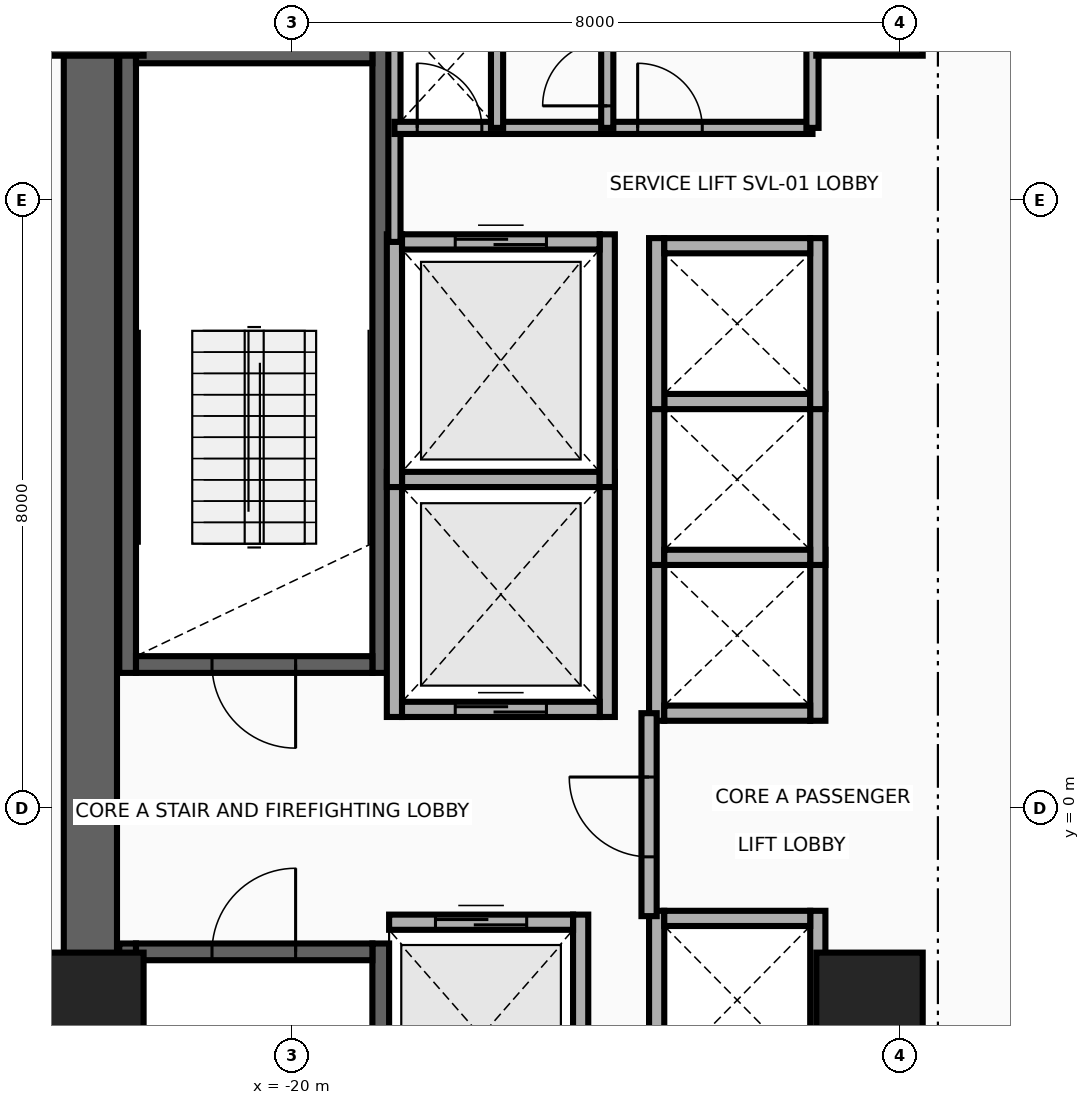
"""IFC4 building model, lengths in metres.
Left out: names, types, materials, properties, quantities, classifications, styles, units other than length and angle.
Written with IfcOpenShell. Run it as: python <this file> out.ifc"""

import sys

from ifc_helpers import new_model, si_unit, direction, frame, frame_2d, origin, origin_2d, place, context, subcontext, project, spatial, rectangle, extrude, source, transform, mapped, element, fill, save


model = new_model("IFC4")
c1 = context("Model", 3, precision=1e-05, world=origin(), true_north=direction((0.0, 1.0)))
c2 = subcontext(c1, "Body", "Model", "MODEL_VIEW")
j1 = project(units=[si_unit("LENGTHUNIT", "METRE"), si_unit("PLANEANGLEUNIT", "RADIAN")], contexts=[c1])
p1 = place(None, origin())
s1 = spatial("IfcSite", under=j1, at=p1, CompositionType="ELEMENT")
p2 = place(p1, origin())
s2 = spatial("IfcBuilding", under=s1, at=p2, CompositionType="ELEMENT")
p3 = place(p2, frame((0.0, 0.0, 44.5)))
s3 = spatial("IfcBuildingStorey", under=s2, at=p3, CompositionType="ELEMENT", Elevation=44.5)
for number, where, z_axis, x_axis in (
    (1, (-22.16, 1.78, 0.0), (0.0, 0.0, 1.0), (0.0, 1.0, 0.0)),
    (2, (-18.83, 1.78, 0.0), (0.0, 0.0, 1.0), (0.0, 1.0, 0.0)),
):
    element("IfcWall", number, at=place(p3, frame(where, z_axis=z_axis, x_axis=x_axis)), inside=s3, PredefinedType="SHEAR", context=c2, shape_type="SweptSolid", body=[
        extrude(rectangle(XDim=8.67, YDim=0.22, at=frame_2d((4.335, 0.0))), origin(), (0.0, 0.0, 1.0), 3.46),
    ])
p4 = place(p3, frame((-22.05, 1.89, 0.0), z_axis=(0.0, 0.0, 1.0), x_axis=(1.0, 0.0, 0.0)))
e3 = element("IfcWall", 3, at=p4, inside=s3, PredefinedType="SHEAR", context=c2, shape_type="SweptSolid", body=[
    extrude(rectangle(XDim=3.11, YDim=0.22, at=frame_2d((1.555, 0.0))), origin(), (0.0, 0.0, 1.0), 3.46),
])
p5 = place(p4, frame((1.0, 0.0, 0.0)))
e4 = element("IfcOpeningElement", 4, at=p5, cuts=e3, PredefinedType="OPENING", context=c2, shape_type="SweptSolid", body=[
    extrude(rectangle(XDim=1.1, YDim=2.15, at=frame_2d((0.55, 1.075))), frame((0.0, 0.125, 0.0), z_axis=(0.0, -1.0, 0.0), x_axis=(1.0, 0.0, 0.0)), (0.0, 0.0, 1.0), 0.25),
])
p6 = place(p3, frame((-22.05, 9.91, 0.0), z_axis=(0.0, 0.0, 1.0), x_axis=(1.0, 0.0, 0.0)))
e5 = element("IfcWall", 5, at=p6, inside=s3, PredefinedType="SHEAR", context=c2, shape_type="SweptSolid", body=[
    extrude(rectangle(XDim=3.11, YDim=0.22, at=frame_2d((1.555, 0.0))), origin(), (0.0, 0.0, 1.0), 3.46),
])
for number, where, z_axis, x_axis in (
    (6, (-22.16, -10.45, 0.0), (0.0, 0.0, 1.0), (0.0, 1.0, 0.0)),
    (7, (-18.83, -10.45, 0.0), (0.0, 0.0, 1.0), (0.0, 1.0, 0.0)),
):
    element("IfcWall", number, at=place(p3, frame(where, z_axis=z_axis, x_axis=x_axis)), inside=s3, PredefinedType="SHEAR", context=c2, shape_type="SweptSolid", body=[
        extrude(rectangle(XDim=8.67, YDim=0.22, at=frame_2d((4.335, 0.0))), origin(), (0.0, 0.0, 1.0), 3.46),
    ])
p7 = place(p3, frame((-22.05, -1.89, 0.0), z_axis=(0.0, 0.0, 1.0), x_axis=(1.0, 0.0, 0.0)))
e8 = element("IfcWall", 8, at=p7, inside=s3, PredefinedType="SHEAR", context=c2, shape_type="SweptSolid", body=[
    extrude(rectangle(XDim=3.11, YDim=0.22, at=frame_2d((1.555, 0.0))), origin(), (0.0, 0.0, 1.0), 3.46),
])
p8 = place(p7, frame((1.0, 0.0, 0.0)))
e9 = element("IfcOpeningElement", 9, at=p8, cuts=e8, PredefinedType="OPENING", context=c2, shape_type="SweptSolid", body=[
    extrude(rectangle(XDim=1.1, YDim=2.15, at=frame_2d((0.55, 1.075))), frame((0.0, 0.125, 0.0), z_axis=(0.0, -1.0, 0.0), x_axis=(1.0, 0.0, 0.0)), (0.0, 0.0, 1.0), 0.25),
])
p9 = place(p3, frame((-22.65, -11.15, 0.0), z_axis=(0.0, 0.0, 1.0), x_axis=(0.0, 1.0, 0.0)))
e10 = element("IfcWall", 10, at=p9, inside=s3, PredefinedType="SHEAR", context=c2, shape_type="SweptSolid", body=[
    extrude(rectangle(XDim=22.3, YDim=0.7, at=frame_2d((11.15, 0.0))), origin(), (0.0, 0.0, 1.0), 3.46),
])
m1 = source(origin(), c2, "Body", "SweptSolid", [
    extrude(rectangle(XDim=1.4, YDim=1.4, at=origin_2d()), origin(), (0.0, 0.0, 1.0), 3.7),
])
for number, where, z_axis, x_axis in (
    (11, (-22.65, -2.6, 0.0), (0.0, 0.0, 1.0), (1.0, 0.0, 0.0)),
    (12, (-12.4, -2.6, 0.0), (0.0, 0.0, 1.0), (1.0, 0.0, 0.0)),
    (13, (-22.65, 10.6, 0.0), (0.0, 0.0, 1.0), (1.0, 0.0, 0.0)),
    (14, (-12.4, 10.6, 0.0), (0.0, 0.0, 1.0), (1.0, 0.0, 0.0)),
):
    element("IfcColumn", number, at=place(p3, frame(where, z_axis=z_axis, x_axis=x_axis)), inside=s3, PredefinedType="COLUMN", context=c2, shape_type="MappedRepresentation", body=[
        mapped(m1, transform((0.0, 0.0, 0.0), x_axis=(1.0, 0.0, 0.0), y_axis=(0.0, 1.0, 0.0), z_axis=(0.0, 0.0, 1.0), scale=1.0)),
    ])
for number, where, z_axis, x_axis in (
    (15, (-18.65, 1.2, 0.0), (0.0, 0.0, 1.0), (0.0, 1.0, 0.0)),
    (16, (-15.85, 1.2, 0.0), (0.0, 0.0, 1.0), (0.0, 1.0, 0.0)),
):
    element("IfcWall", number, at=place(p3, frame(where, z_axis=z_axis, x_axis=x_axis)), inside=s3, PredefinedType="MOVABLE", context=c2, shape_type="SweptSolid", body=[
        extrude(rectangle(XDim=3.225, YDim=0.2, at=frame_2d((1.613, 0.0))), origin(), (0.0, 0.0, 1.0), 3.46),
    ])
p10 = place(p3, frame((-18.55, 1.3, 0.0), z_axis=(0.0, 0.0, 1.0), x_axis=(1.0, 0.0, 0.0)))
e17 = element("IfcWall", 17, at=p10, inside=s3, PredefinedType="MOVABLE", context=c2, shape_type="SweptSolid", body=[
    extrude(rectangle(XDim=2.6, YDim=0.2, at=frame_2d((1.3, 0.0))), origin(), (0.0, 0.0, 1.0), 3.46),
])
p11 = place(p10, frame((0.7, 0.0, 0.0)))
e18 = element("IfcOpeningElement", 18, at=p11, cuts=e17, PredefinedType="OPENING", context=c2, shape_type="SweptSolid", body=[
    extrude(rectangle(XDim=1.2, YDim=2.1, at=frame_2d((0.6, 1.05))), frame((0.0, 0.115, 0.0), z_axis=(0.0, -1.0, 0.0), x_axis=(1.0, 0.0, 0.0)), (0.0, 0.0, 1.0), 0.23),
])
p12 = place(p3, frame((-18.55, 4.325, 0.0), z_axis=(0.0, 0.0, 1.0), x_axis=(1.0, 0.0, 0.0)))
e19 = element("IfcWall", 19, at=p12, inside=s3, PredefinedType="MOVABLE", context=c2, shape_type="SweptSolid", body=[
    extrude(rectangle(XDim=2.6, YDim=0.2, at=frame_2d((1.3, 0.0))), origin(), (0.0, 0.0, 1.0), 3.46),
])
p13 = place(p3, frame((-16.2, -4.6, 0.0), z_axis=(0.0, 0.0, 1.0), x_axis=(0.0, 1.0, 0.0)))
e20 = element("IfcWall", 20, at=p13, inside=s3, PredefinedType="MOVABLE", context=c2, shape_type="SweptSolid", body=[
    extrude(rectangle(XDim=3.2, YDim=0.2, at=frame_2d((1.6, 0.0))), origin(), (0.0, 0.0, 1.0), 3.46),
])
p14 = place(p3, frame((-18.72, -1.5, 0.0), z_axis=(0.0, 0.0, 1.0), x_axis=(1.0, 0.0, 0.0)))
e21 = element("IfcWall", 21, at=p14, inside=s3, PredefinedType="MOVABLE", context=c2, shape_type="SweptSolid", body=[
    extrude(rectangle(XDim=2.42, YDim=0.2, at=frame_2d((1.21, 0.0))), origin(), (0.0, 0.0, 1.0), 3.46),
])
p15 = place(p14, frame((0.61, 0.0, 0.0)))
e22 = element("IfcOpeningElement", 22, at=p15, cuts=e21, PredefinedType="OPENING", context=c2, shape_type="SweptSolid", body=[
    extrude(rectangle(XDim=1.2, YDim=2.1, at=frame_2d((0.6, 1.05))), frame((0.0, 0.115, 0.0), z_axis=(0.0, -1.0, 0.0), x_axis=(1.0, 0.0, 0.0)), (0.0, 0.0, 1.0), 0.23),
])
for number, where, z_axis, x_axis in (
    (23, (-18.65, 4.225, 0.0), (0.0, 0.0, 1.0), (0.0, 1.0, 0.0)),
    (24, (-15.85, 4.225, 0.0), (0.0, 0.0, 1.0), (0.0, 1.0, 0.0)),
):
    element("IfcWall", number, at=place(p3, frame(where, z_axis=z_axis, x_axis=x_axis)), inside=s3, PredefinedType="MOVABLE", context=c2, shape_type="SweptSolid", body=[
        extrude(rectangle(XDim=3.325, YDim=0.2, at=frame_2d((1.663, 0.0))), origin(), (0.0, 0.0, 1.0), 3.46),
    ])
p16 = place(p3, frame((-18.55, 7.45, 0.0), z_axis=(0.0, 0.0, 1.0), x_axis=(1.0, 0.0, 0.0)))
e25 = element("IfcWall", 25, at=p16, inside=s3, PredefinedType="MOVABLE", context=c2, shape_type="SweptSolid", body=[
    extrude(rectangle(XDim=2.6, YDim=0.2, at=frame_2d((1.3, 0.0))), origin(), (0.0, 0.0, 1.0), 3.46),
])
p17 = place(p16, frame((0.7, 0.0, 0.0)))
e26 = element("IfcOpeningElement", 26, at=p17, cuts=e25, PredefinedType="OPENING", context=c2, shape_type="SweptSolid", body=[
    extrude(rectangle(XDim=1.2, YDim=2.1, at=frame_2d((0.6, 1.05))), frame((0.0, 0.115, 0.0), z_axis=(0.0, -1.0, 0.0), x_axis=(1.0, 0.0, 0.0)), (0.0, 0.0, 1.0), 0.23),
])
for number, where, z_axis, x_axis in (
    (27, (-15.2, 1.15, 0.0), (0.0, 0.0, 1.0), (0.0, 1.0, 0.0)),
    (28, (-13.08, 1.15, 0.0), (0.0, 0.0, 1.0), (0.0, 1.0, 0.0)),
):
    element("IfcWall", number, at=place(p3, frame(where, z_axis=z_axis, x_axis=x_axis)), inside=s3, PredefinedType="MOVABLE", context=c2, shape_type="SweptSolid", body=[
        extrude(rectangle(XDim=2.25, YDim=0.2, at=frame_2d((1.125, 0.0))), origin(), (0.0, 0.0, 1.0), 3.46),
    ])
p18 = place(p3, frame((-15.1, 1.25, 0.0), z_axis=(0.0, 0.0, 1.0), x_axis=(1.0, 0.0, 0.0)))
e29 = element("IfcWall", 29, at=p18, inside=s3, PredefinedType="MOVABLE", context=c2, shape_type="SweptSolid", body=[
    extrude(rectangle(XDim=1.92, YDim=0.2, at=frame_2d((0.96, 0.0))), origin(), (0.0, 0.0, 1.0), 3.46),
])
for number, where, z_axis, x_axis in (
    (30, (-15.2, 3.2, 0.0), (0.0, 0.0, 1.0), (0.0, 1.0, 0.0)),
    (31, (-13.08, 3.2, 0.0), (0.0, 0.0, 1.0), (0.0, 1.0, 0.0)),
):
    element("IfcWall", number, at=place(p3, frame(where, z_axis=z_axis, x_axis=x_axis)), inside=s3, PredefinedType="MOVABLE", context=c2, shape_type="SweptSolid", body=[
        extrude(rectangle(XDim=2.25, YDim=0.2, at=frame_2d((1.125, 0.0))), origin(), (0.0, 0.0, 1.0), 3.46),
    ])
for number, where, z_axis, x_axis in (
    (32, (-15.1, 3.3, 0.0), (0.0, 0.0, 1.0), (1.0, 0.0, 0.0)),
    (33, (-15.1, 5.35, 0.0), (0.0, 0.0, 1.0), (1.0, 0.0, 0.0)),
):
    element("IfcWall", number, at=place(p3, frame(where, z_axis=z_axis, x_axis=x_axis)), inside=s3, PredefinedType="MOVABLE", context=c2, shape_type="SweptSolid", body=[
        extrude(rectangle(XDim=1.92, YDim=0.2, at=frame_2d((0.96, 0.0))), origin(), (0.0, 0.0, 1.0), 3.46),
    ])
for number, where, z_axis, x_axis in (
    (34, (-15.2, 5.25, 0.0), (0.0, 0.0, 1.0), (0.0, 1.0, 0.0)),
    (35, (-13.08, 5.25, 0.0), (0.0, 0.0, 1.0), (0.0, 1.0, 0.0)),
):
    element("IfcWall", number, at=place(p3, frame(where, z_axis=z_axis, x_axis=x_axis)), inside=s3, PredefinedType="MOVABLE", context=c2, shape_type="SweptSolid", body=[
        extrude(rectangle(XDim=2.25, YDim=0.2, at=frame_2d((1.125, 0.0))), origin(), (0.0, 0.0, 1.0), 3.46),
    ])
p19 = place(p3, frame((-15.1, 7.4, 0.0), z_axis=(0.0, 0.0, 1.0), x_axis=(1.0, 0.0, 0.0)))
e36 = element("IfcWall", 36, at=p19, inside=s3, PredefinedType="MOVABLE", context=c2, shape_type="SweptSolid", body=[
    extrude(rectangle(XDim=1.92, YDim=0.2, at=frame_2d((0.96, 0.0))), origin(), (0.0, 0.0, 1.0), 3.46),
])
for number, where, z_axis, x_axis in (
    (37, (-15.2, -3.7, 0.0), (0.0, 0.0, 1.0), (0.0, 1.0, 0.0)),
    (38, (-13.08, -3.7, 0.0), (0.0, 0.0, 1.0), (0.0, 1.0, 0.0)),
):
    element("IfcWall", number, at=place(p3, frame(where, z_axis=z_axis, x_axis=x_axis)), inside=s3, PredefinedType="MOVABLE", context=c2, shape_type="SweptSolid", body=[
        extrude(rectangle(XDim=2.35, YDim=0.2, at=frame_2d((1.175, 0.0))), origin(), (0.0, 0.0, 1.0), 3.46),
    ])
p20 = place(p3, frame((-15.1, -1.45, 0.0), z_axis=(0.0, 0.0, 1.0), x_axis=(1.0, 0.0, 0.0)))
e39 = element("IfcWall", 39, at=p20, inside=s3, PredefinedType="MOVABLE", context=c2, shape_type="SweptSolid", body=[
    extrude(rectangle(XDim=1.92, YDim=0.2, at=frame_2d((0.96, 0.0))), origin(), (0.0, 0.0, 1.0), 3.46),
])
p21 = place(p3, frame((-15.3, -1.42, 0.0), z_axis=(0.0, 0.0, 1.0), x_axis=(0.0, 1.0, 0.0)))
e40 = element("IfcWall", 40, at=p21, inside=s3, PredefinedType="PARTITIONING", context=c2, shape_type="SweptSolid", body=[
    extrude(rectangle(XDim=2.67, YDim=0.2, at=frame_2d((1.335, 0.0))), origin(), (0.0, 0.0, 1.0), 3.46),
])
p22 = place(p21, frame((0.78, 0.0, 0.0)))
e41 = element("IfcOpeningElement", 41, at=p22, cuts=e40, PredefinedType="OPENING", context=c2, shape_type="SweptSolid", body=[
    extrude(rectangle(XDim=1.05, YDim=2.15, at=frame_2d((0.525, 1.075))), frame((0.0, 0.115, 0.0), z_axis=(0.0, -1.0, 0.0), x_axis=(1.0, 0.0, 0.0)), (0.0, 0.0, 1.0), 0.23),
])
p23 = place(p3, frame((-18.65, 7.45, 0.0), z_axis=(0.0, 0.0, 1.0), x_axis=(0.0, 1.0, 0.0)))
e42 = element("IfcWall", 42, at=p23, inside=s3, PredefinedType="PARTITIONING", context=c2, shape_type="SweptSolid", body=[
    extrude(rectangle(XDim=2.93, YDim=0.16, at=frame_2d((1.465, 0.0))), origin(), (0.0, 0.0, 1.0), 3.46),
])
p24 = place(p3, frame((-18.65, 8.95, 0.0), z_axis=(0.0, 0.0, 1.0), x_axis=(1.0, 0.0, 0.0)))
e43 = element("IfcWall", 43, at=p24, inside=s3, PredefinedType="PARTITIONING", context=c2, shape_type="SweptSolid", body=[
    extrude(rectangle(XDim=5.5, YDim=0.16, at=frame_2d((2.75, 0.0))), origin(), (0.0, 0.0, 1.0), 3.46),
])
p25 = place(p24, frame((0.3, 0.0, 0.0)))
e44 = element("IfcOpeningElement", 44, at=p25, cuts=e43, PredefinedType="OPENING", context=c2, shape_type="SweptSolid", body=[
    extrude(rectangle(XDim=0.85, YDim=2.05, at=frame_2d((0.425, 1.025))), frame((0.0, 0.095, 0.0), z_axis=(0.0, -1.0, 0.0), x_axis=(1.0, 0.0, 0.0)), (0.0, 0.0, 1.0), 0.19),
])
p26 = place(p24, frame((3.2, 0.0, 0.0)))
e45 = element("IfcOpeningElement", 45, at=p26, cuts=e43, PredefinedType="OPENING", context=c2, shape_type="SweptSolid", body=[
    extrude(rectangle(XDim=0.85, YDim=2.05, at=frame_2d((0.425, 1.025))), frame((0.0, 0.095, 0.0), z_axis=(0.0, -1.0, 0.0), x_axis=(1.0, 0.0, 0.0)), (0.0, 0.0, 1.0), 0.19),
])
for number, where, z_axis, x_axis in (
    (46, (-13.15, 8.95, 0.0), (0.0, 0.0, 1.0), (0.0, 1.0, 0.0)),
    (47, (-17.3, 8.95, 0.0), (0.0, 0.0, 1.0), (0.0, 1.0, 0.0)),
):
    element("IfcWall", number, at=place(p3, frame(where, z_axis=z_axis, x_axis=x_axis)), inside=s3, PredefinedType="PARTITIONING", context=c2, shape_type="SweptSolid", body=[
        extrude(rectangle(XDim=1.43, YDim=0.16, at=frame_2d((0.715, 0.0))), origin(), (0.0, 0.0, 1.0), 3.46),
    ])
p27 = place(p3, frame((-15.85, 8.95, 0.0), z_axis=(0.0, 0.0, 1.0), x_axis=(0.0, 1.0, 0.0)))
e48 = element("IfcWall", 48, at=p27, inside=s3, PredefinedType="PARTITIONING", context=c2, shape_type="SweptSolid", body=[
    extrude(rectangle(XDim=1.43, YDim=0.16, at=frame_2d((0.715, 0.0))), origin(), (0.0, 0.0, 1.0), 3.46),
])
p28 = place(p27, frame((0.29, 0.0, 0.0)))
e49 = element("IfcOpeningElement", 49, at=p28, cuts=e48, PredefinedType="OPENING", context=c2, shape_type="SweptSolid", body=[
    extrude(rectangle(XDim=0.85, YDim=2.05, at=frame_2d((0.425, 1.025))), frame((0.0, 0.095, 0.0), z_axis=(0.0, -1.0, 0.0), x_axis=(1.0, 0.0, 0.0)), (0.0, 0.0, 1.0), 0.19),
])
p29 = place(p11, origin())
e50 = element("IfcDoor", 50, at=p29, inside=s3, OperationType="DOUBLE_DOOR_SLIDING", PredefinedType="DOOR", context=c2, shape_type="SweptSolid", body=[
    extrude(rectangle(XDim=1.2, YDim=2.1, at=frame_2d((0.6, 1.05))), frame((0.0, 0.025, 0.0), z_axis=(0.0, -1.0, 0.0), x_axis=(1.0, 0.0, 0.0)), (0.0, 0.0, 1.0), 0.05),
])
fill(e18, e50)
p30 = place(p15, origin())
e51 = element("IfcDoor", 51, at=p30, inside=s3, OperationType="DOUBLE_DOOR_SLIDING", PredefinedType="DOOR", context=c2, shape_type="SweptSolid", body=[
    extrude(rectangle(XDim=1.2, YDim=2.1, at=frame_2d((0.6, 1.05))), frame((0.0, 0.025, 0.0), z_axis=(0.0, -1.0, 0.0), x_axis=(1.0, 0.0, 0.0)), (0.0, 0.0, 1.0), 0.05),
])
fill(e22, e51)
p31 = place(p17, origin())
e52 = element("IfcDoor", 52, at=p31, inside=s3, OperationType="DOUBLE_DOOR_SLIDING", PredefinedType="DOOR", context=c2, shape_type="SweptSolid", body=[
    extrude(rectangle(XDim=1.2, YDim=2.1, at=frame_2d((0.6, 1.05))), frame((0.0, 0.025, 0.0), z_axis=(0.0, -1.0, 0.0), x_axis=(1.0, 0.0, 0.0)), (0.0, 0.0, 1.0), 0.05),
])
fill(e26, e52)
p32 = place(p22, origin())
e53 = element("IfcDoor", 53, at=p32, inside=s3, OperationType="SINGLE_SWING_RIGHT", PredefinedType="DOOR", context=c2, shape_type="SweptSolid", body=[
    extrude(rectangle(XDim=1.05, YDim=2.15, at=frame_2d((0.525, 1.075))), frame((0.0, 0.025, 0.0), z_axis=(0.0, -1.0, 0.0), x_axis=(1.0, 0.0, 0.0)), (0.0, 0.0, 1.0), 0.05),
])
fill(e41, e53)
p33 = place(p5, frame((1.1, 0.0, 0.0), z_axis=(0.0, 0.0, 1.0), x_axis=(-1.0, 0.0, 0.0)))
e54 = element("IfcDoor", 54, at=p33, inside=s3, OperationType="SINGLE_SWING_LEFT", PredefinedType="DOOR", context=c2, shape_type="SweptSolid", body=[
    extrude(rectangle(XDim=1.1, YDim=2.15, at=frame_2d((0.55, 1.075))), frame((0.0, 0.025, 0.0), z_axis=(0.0, -1.0, 0.0), x_axis=(1.0, 0.0, 0.0)), (0.0, 0.0, 1.0), 0.05),
])
fill(e4, e54)
p34 = place(p8, origin())
e55 = element("IfcDoor", 55, at=p34, inside=s3, OperationType="SINGLE_SWING_RIGHT", PredefinedType="DOOR", context=c2, shape_type="SweptSolid", body=[
    extrude(rectangle(XDim=1.1, YDim=2.15, at=frame_2d((0.55, 1.075))), frame((0.0, 0.025, 0.0), z_axis=(0.0, -1.0, 0.0), x_axis=(1.0, 0.0, 0.0)), (0.0, 0.0, 1.0), 0.05),
])
fill(e9, e55)
p35 = place(p25, origin())
e56 = element("IfcDoor", 56, at=p35, inside=s3, OperationType="SINGLE_SWING_LEFT", PredefinedType="DOOR", context=c2, shape_type="SweptSolid", body=[
    extrude(rectangle(XDim=0.85, YDim=2.05, at=frame_2d((0.425, 1.025))), frame((0.0, 0.025, 0.0), z_axis=(0.0, -1.0, 0.0), x_axis=(1.0, 0.0, 0.0)), (0.0, 0.0, 1.0), 0.05),
])
fill(e44, e56)
p36 = place(p26, origin())
e57 = element("IfcDoor", 57, at=p36, inside=s3, OperationType="SINGLE_SWING_RIGHT", PredefinedType="DOOR", context=c2, shape_type="SweptSolid", body=[
    extrude(rectangle(XDim=0.85, YDim=2.05, at=frame_2d((0.425, 1.025))), frame((0.0, 0.025, 0.0), z_axis=(0.0, -1.0, 0.0), x_axis=(1.0, 0.0, 0.0)), (0.0, 0.0, 1.0), 0.05),
])
fill(e45, e57)
p37 = place(p28, origin())
e58 = element("IfcDoor", 58, at=p37, inside=s3, OperationType="SINGLE_SWING_LEFT", PredefinedType="DOOR", context=c2, shape_type="SweptSolid", body=[
    extrude(rectangle(XDim=0.85, YDim=2.05, at=frame_2d((0.425, 1.025))), frame((0.0, 0.025, 0.0), z_axis=(0.0, -1.0, 0.0), x_axis=(1.0, 0.0, 0.0)), (0.0, 0.0, 1.0), 0.05),
])
fill(e49, e58)
save(model, sys.argv[1])
